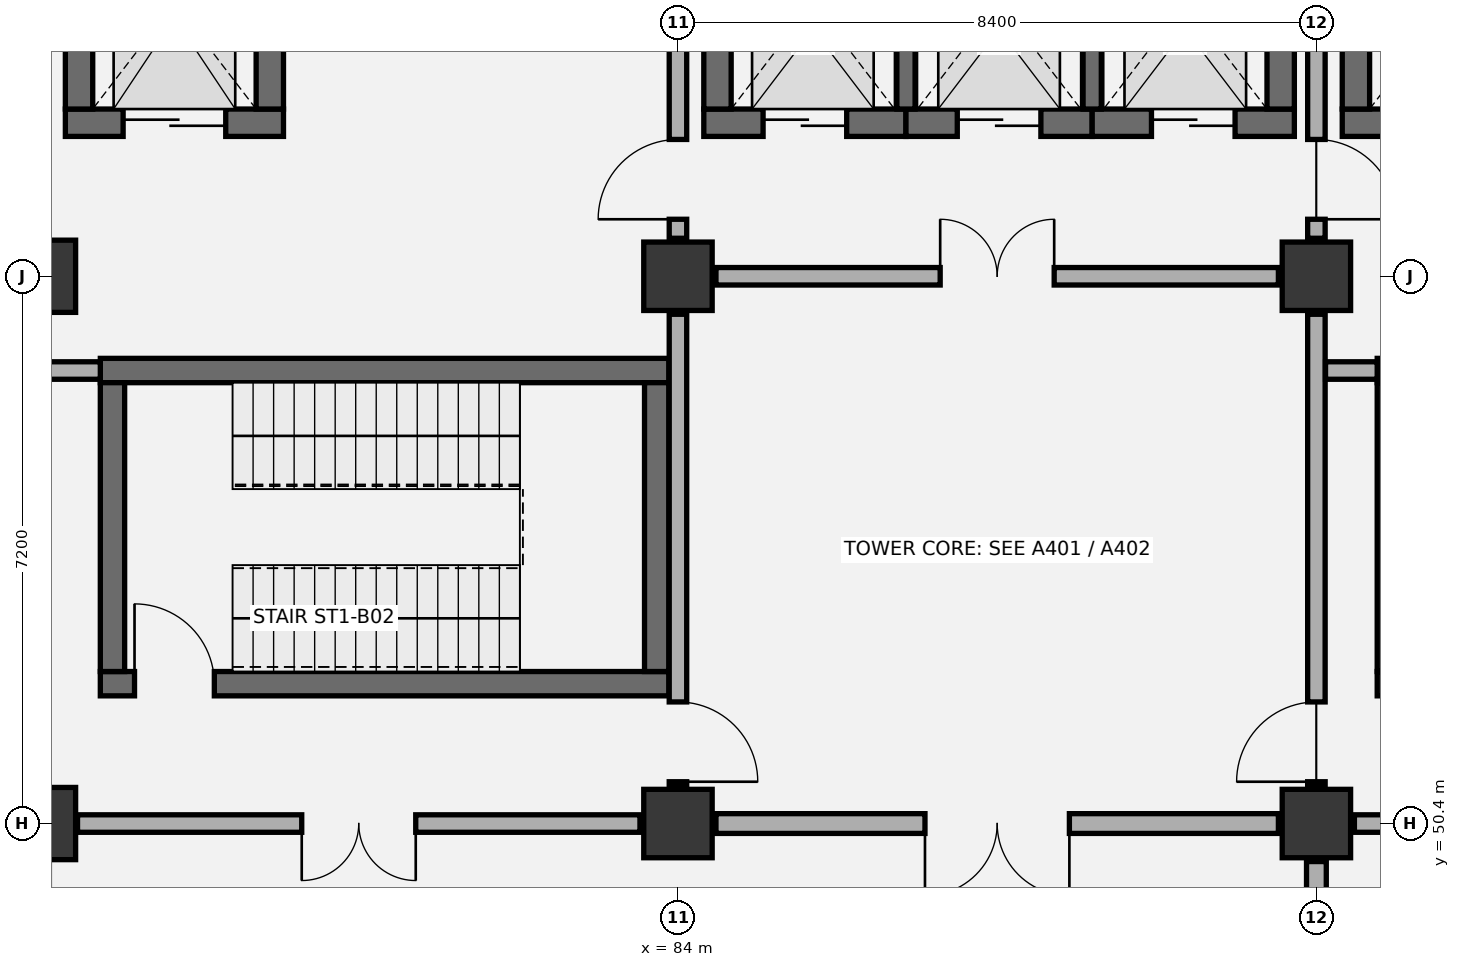
"""IFC4 building model, lengths in metres.
Left out: names, types, materials, properties, quantities, classifications, styles, units other than length and angle.
Written with IfcOpenShell. Run it as: python <this file> out.ifc"""

import sys

from ifc_helpers import new_model, si_unit, direction, frame, frame_2d, origin, origin_2d, place, context, subcontext, project, spatial, rectangle, extrude, element, fill, save


model = new_model("IFC4")
c1 = context("Model", 3, precision=1e-05, world=origin(), true_north=direction((0.0, 1.0)))
c2 = subcontext(c1, "Body", "Model", "MODEL_VIEW")
j1 = project(units=[si_unit("LENGTHUNIT", "METRE"), si_unit("PLANEANGLEUNIT", "RADIAN")], contexts=[c1])
p1 = place(None, origin())
s1 = spatial("IfcSite", under=j1, at=p1, CompositionType="ELEMENT")
p2 = place(p1, origin())
s2 = spatial("IfcBuilding", under=s1, at=p2, CompositionType="ELEMENT")
p3 = place(p2, frame((0.0, 0.0, -9.6)))
s3 = spatial("IfcBuildingStorey", under=s2, at=p3, CompositionType="ELEMENT", Elevation=-9.6)
for number, where, z_axis, x_axis in (
    (1, (75.6, 50.4, 0.0), (0.0, 0.0, 1.0), (1.0, 0.0, 0.0)),
    (2, (75.6, 57.6, 0.0), (0.0, 0.0, 1.0), (1.0, 0.0, 0.0)),
):
    element("IfcColumn", number, at=place(p3, frame(where, z_axis=z_axis, x_axis=x_axis)), inside=s3, PredefinedType="COLUMN", context=c2, shape_type="SweptSolid", body=[
        extrude(rectangle(XDim=0.95, YDim=0.95, at=origin_2d()), origin(), (0.0, 0.0, 1.0), 4.8),
    ])
for number, where, z_axis, x_axis in (
    (3, (84.0, 50.4, 0.0), (0.0, 0.0, 1.0), (1.0, 0.0, 0.0)),
    (4, (84.0, 57.6, 0.0), (0.0, 0.0, 1.0), (1.0, 0.0, 0.0)),
    (5, (92.4, 50.4, 0.0), (0.0, 0.0, 1.0), (1.0, 0.0, 0.0)),
    (6, (92.4, 57.6, 0.0), (0.0, 0.0, 1.0), (1.0, 0.0, 0.0)),
):
    element("IfcColumn", number, at=place(p3, frame(where, z_axis=z_axis, x_axis=x_axis)), inside=s3, PredefinedType="COLUMN", context=c2, shape_type="SweptSolid", body=[
        extrude(rectangle(XDim=0.9, YDim=0.9, at=origin_2d()), origin(), (0.0, 0.0, 1.0), 4.8),
    ])
p4 = place(p3, frame((76.4, 52.24, 0.0), z_axis=(0.0, 0.0, 1.0), x_axis=(1.0, 0.0, 0.0)))
e7 = element("IfcWall", 7, at=p4, inside=s3, PredefinedType="SHEAR", context=c2, shape_type="SweptSolid", body=[
    extrude(rectangle(XDim=7.48, YDim=0.32, at=frame_2d((3.74, 0.0))), origin(), (0.0, 0.0, 1.0), 4.4),
])
p5 = place(p4, frame((0.45, 0.0, 0.0)))
e8 = element("IfcOpeningElement", 8, at=p5, cuts=e7, PredefinedType="OPENING", context=c2, shape_type="SweptSolid", body=[
    extrude(rectangle(XDim=1.05, YDim=2.15, at=frame_2d((0.525, 1.075))), frame((0.0, 0.17, 0.0), z_axis=(0.0, -1.0, 0.0), x_axis=(1.0, 0.0, 0.0)), (0.0, 0.0, 1.0), 0.34),
])
p6 = place(p3, frame((76.4, 56.36, 0.0), z_axis=(0.0, 0.0, 1.0), x_axis=(1.0, 0.0, 0.0)))
e9 = element("IfcWall", 9, at=p6, inside=s3, PredefinedType="SHEAR", context=c2, shape_type="SweptSolid", body=[
    extrude(rectangle(XDim=7.48, YDim=0.32, at=frame_2d((3.74, 0.0))), origin(), (0.0, 0.0, 1.0), 4.4),
])
for number, where, z_axis, x_axis in (
    (10, (76.56, 52.4, 0.0), (0.0, 0.0, 1.0), (0.0, 1.0, 0.0)),
    (11, (83.72, 52.4, 0.0), (0.0, 0.0, 1.0), (0.0, 1.0, 0.0)),
):
    element("IfcWall", number, at=place(p3, frame(where, z_axis=z_axis, x_axis=x_axis)), inside=s3, PredefinedType="SHEAR", context=c2, shape_type="SweptSolid", body=[
        extrude(rectangle(XDim=3.8, YDim=0.32, at=frame_2d((1.9, 0.0))), origin(), (0.0, 0.0, 1.0), 4.4),
    ])
p7 = place(p3, frame((93.2, 52.24, 0.0), z_axis=(0.0, 0.0, 1.0), x_axis=(1.0, 0.0, 0.0)))
e12 = element("IfcWall", 12, at=p7, inside=s3, PredefinedType="SHEAR", context=c2, shape_type="SweptSolid", body=[
    extrude(rectangle(XDim=7.48, YDim=0.32, at=frame_2d((3.74, 0.0))), origin(), (0.0, 0.0, 1.0), 4.4),
])
p8 = place(p7, frame((0.45, 0.0, 0.0)))
e13 = element("IfcOpeningElement", 13, at=p8, cuts=e12, PredefinedType="OPENING", context=c2, shape_type="SweptSolid", body=[
    extrude(rectangle(XDim=1.05, YDim=2.15, at=frame_2d((0.525, 1.075))), frame((0.0, 0.17, 0.0), z_axis=(0.0, -1.0, 0.0), x_axis=(1.0, 0.0, 0.0)), (0.0, 0.0, 1.0), 0.34),
])
p9 = place(p3, frame((93.2, 56.36, 0.0), z_axis=(0.0, 0.0, 1.0), x_axis=(1.0, 0.0, 0.0)))
e14 = element("IfcWall", 14, at=p9, inside=s3, PredefinedType="SHEAR", context=c2, shape_type="SweptSolid", body=[
    extrude(rectangle(XDim=7.48, YDim=0.32, at=frame_2d((3.74, 0.0))), origin(), (0.0, 0.0, 1.0), 4.4),
])
p10 = place(p3, frame((93.36, 52.4, 0.0), z_axis=(0.0, 0.0, 1.0), x_axis=(0.0, 1.0, 0.0)))
e15 = element("IfcWall", 15, at=p10, inside=s3, PredefinedType="SHEAR", context=c2, shape_type="SweptSolid", body=[
    extrude(rectangle(XDim=3.8, YDim=0.32, at=frame_2d((1.9, 0.0))), origin(), (0.0, 0.0, 1.0), 4.4),
])
p11 = place(p3, frame((75.94, 59.62, -0.75), z_axis=(0.0, 0.0, 1.0), x_axis=(1.0, 0.0, 0.0)))
e16 = element("IfcWall", 16, at=p11, inside=s3, PredefinedType="SHEAR", context=c2, shape_type="SweptSolid", body=[
    extrude(rectangle(XDim=2.87, YDim=0.36, at=frame_2d((1.435, 0.0))), origin(), (0.0, 0.0, 1.0), 5.15),
])
p12 = place(p11, frame((0.76, 0.0, 0.75)))
e17 = element("IfcOpeningElement", 17, at=p12, cuts=e16, PredefinedType="OPENING", context=c2, shape_type="SweptSolid", body=[
    extrude(rectangle(XDim=1.35, YDim=2.2, at=frame_2d((0.675, 1.1))), frame((0.0, 0.19, 0.0), z_axis=(0.0, -1.0, 0.0), x_axis=(1.0, 0.0, 0.0)), (0.0, 0.0, 1.0), 0.38),
])
for number, where, z_axis, x_axis in (
    (18, (76.12, 59.8, -0.75), (0.0, 0.0, 1.0), (0.0, 1.0, 0.0)),
    (19, (78.63, 59.8, -0.75), (0.0, 0.0, 1.0), (0.0, 1.0, 0.0)),
):
    element("IfcWall", number, at=place(p3, frame(where, z_axis=z_axis, x_axis=x_axis)), inside=s3, PredefinedType="SHEAR", context=c2, shape_type="SweptSolid", body=[
        extrude(rectangle(XDim=2.8, YDim=0.36, at=frame_2d((1.4, 0.0))), origin(), (0.0, 0.0, 1.0), 5.15),
    ])
p13 = place(p3, frame((84.34, 59.62, -0.75), z_axis=(0.0, 0.0, 1.0), x_axis=(1.0, 0.0, 0.0)))
e20 = element("IfcWall", 20, at=p13, inside=s3, PredefinedType="SHEAR", context=c2, shape_type="SweptSolid", body=[
    extrude(rectangle(XDim=2.66, YDim=0.36, at=frame_2d((1.33, 0.0))), origin(), (0.0, 0.0, 1.0), 5.15),
])
p14 = place(p13, frame((0.78, 0.0, 0.75)))
e21 = element("IfcOpeningElement", 21, at=p14, cuts=e20, PredefinedType="OPENING", context=c2, shape_type="SweptSolid", body=[
    extrude(rectangle(XDim=1.1, YDim=2.15, at=frame_2d((0.55, 1.075))), frame((0.0, 0.19, 0.0), z_axis=(0.0, -1.0, 0.0), x_axis=(1.0, 0.0, 0.0)), (0.0, 0.0, 1.0), 0.38),
])
p15 = place(p3, frame((87.0, 59.62, -0.75), z_axis=(0.0, 0.0, 1.0), x_axis=(1.0, 0.0, 0.0)))
e22 = element("IfcWall", 22, at=p15, inside=s3, PredefinedType="SHEAR", context=c2, shape_type="SweptSolid", body=[
    extrude(rectangle(XDim=2.45, YDim=0.36, at=frame_2d((1.225, 0.0))), origin(), (0.0, 0.0, 1.0), 5.15),
])
p16 = place(p15, frame((0.675, 0.0, 0.75)))
e23 = element("IfcOpeningElement", 23, at=p16, cuts=e22, PredefinedType="OPENING", context=c2, shape_type="SweptSolid", body=[
    extrude(rectangle(XDim=1.1, YDim=2.15, at=frame_2d((0.55, 1.075))), frame((0.0, 0.19, 0.0), z_axis=(0.0, -1.0, 0.0), x_axis=(1.0, 0.0, 0.0)), (0.0, 0.0, 1.0), 0.38),
])
p17 = place(p3, frame((89.45, 59.62, -0.75), z_axis=(0.0, 0.0, 1.0), x_axis=(1.0, 0.0, 0.0)))
e24 = element("IfcWall", 24, at=p17, inside=s3, PredefinedType="SHEAR", context=c2, shape_type="SweptSolid", body=[
    extrude(rectangle(XDim=2.66, YDim=0.36, at=frame_2d((1.33, 0.0))), origin(), (0.0, 0.0, 1.0), 5.15),
])
p18 = place(p17, frame((0.78, 0.0, 0.75)))
e25 = element("IfcOpeningElement", 25, at=p18, cuts=e24, PredefinedType="OPENING", context=c2, shape_type="SweptSolid", body=[
    extrude(rectangle(XDim=1.1, YDim=2.15, at=frame_2d((0.55, 1.075))), frame((0.0, 0.19, 0.0), z_axis=(0.0, -1.0, 0.0), x_axis=(1.0, 0.0, 0.0)), (0.0, 0.0, 1.0), 0.38),
])
for number, where, z_axis, x_axis in (
    (26, (84.52, 59.8, -0.75), (0.0, 0.0, 1.0), (0.0, 1.0, 0.0)),
    (27, (91.93, 59.8, -0.75), (0.0, 0.0, 1.0), (0.0, 1.0, 0.0)),
):
    element("IfcWall", number, at=place(p3, frame(where, z_axis=z_axis, x_axis=x_axis)), inside=s3, PredefinedType="SHEAR", context=c2, shape_type="SweptSolid", body=[
        extrude(rectangle(XDim=2.8, YDim=0.36, at=frame_2d((1.4, 0.0))), origin(), (0.0, 0.0, 1.0), 5.15),
    ])
for number, where, z_axis, x_axis in (
    (28, (87.0, 59.8, -0.75), (0.0, 0.0, 1.0), (0.0, 1.0, 0.0)),
    (29, (89.45, 59.8, -0.75), (0.0, 0.0, 1.0), (0.0, 1.0, 0.0)),
):
    element("IfcWall", number, at=place(p3, frame(where, z_axis=z_axis, x_axis=x_axis)), inside=s3, PredefinedType="SHEAR", context=c2, shape_type="SweptSolid", body=[
        extrude(rectangle(XDim=2.8, YDim=0.24, at=frame_2d((1.4, 0.0))), origin(), (0.0, 0.0, 1.0), 5.15),
    ])
p19 = place(p3, frame((92.74, 59.62, -0.75), z_axis=(0.0, 0.0, 1.0), x_axis=(1.0, 0.0, 0.0)))
e30 = element("IfcWall", 30, at=p19, inside=s3, PredefinedType="SHEAR", context=c2, shape_type="SweptSolid", body=[
    extrude(rectangle(XDim=2.87, YDim=0.36, at=frame_2d((1.435, 0.0))), origin(), (0.0, 0.0, 1.0), 5.15),
])
p20 = place(p19, frame((0.76, 0.0, 0.75)))
e31 = element("IfcOpeningElement", 31, at=p20, cuts=e30, PredefinedType="OPENING", context=c2, shape_type="SweptSolid", body=[
    extrude(rectangle(XDim=1.35, YDim=2.2, at=frame_2d((0.675, 1.1))), frame((0.0, 0.19, 0.0), z_axis=(0.0, -1.0, 0.0), x_axis=(1.0, 0.0, 0.0)), (0.0, 0.0, 1.0), 0.38),
])
p21 = place(p3, frame((92.92, 59.8, -0.75), z_axis=(0.0, 0.0, 1.0), x_axis=(0.0, 1.0, 0.0)))
e32 = element("IfcWall", 32, at=p21, inside=s3, PredefinedType="SHEAR", context=c2, shape_type="SweptSolid", body=[
    extrude(rectangle(XDim=2.8, YDim=0.36, at=frame_2d((1.4, 0.0))), origin(), (0.0, 0.0, 1.0), 5.15),
])
p22 = place(p3, frame((76.1, 50.4, 0.0), z_axis=(0.0, 0.0, 1.0), x_axis=(1.0, 0.0, 0.0)))
e33 = element("IfcWall", 33, at=p22, inside=s3, PredefinedType="PARTITIONING", context=c2, shape_type="SweptSolid", body=[
    extrude(rectangle(XDim=7.4, YDim=0.23, at=frame_2d((3.7, 0.0))), origin(), (0.0, 0.0, 1.0), 3.495),
])
p23 = place(p22, frame((2.95, 0.0, 0.0)))
e34 = element("IfcOpeningElement", 34, at=p23, cuts=e33, PredefinedType="OPENING", context=c2, shape_type="SweptSolid", body=[
    extrude(rectangle(XDim=1.5, YDim=2.15, at=frame_2d((0.75, 1.075))), frame((0.0, 0.125, 0.0), z_axis=(0.0, -1.0, 0.0), x_axis=(1.0, 0.0, 0.0)), (0.0, 0.0, 1.0), 0.25),
])
p24 = place(p3, frame((84.0, 50.9, 0.0), z_axis=(0.0, 0.0, 1.0), x_axis=(0.0, 1.0, 0.0)))
e35 = element("IfcWall", 35, at=p24, inside=s3, PredefinedType="PARTITIONING", context=c2, shape_type="SweptSolid", body=[
    extrude(rectangle(XDim=6.2, YDim=0.23, at=frame_2d((3.1, 0.0))), origin(), (0.0, 0.0, 1.0), 3.595),
])
p25 = place(p24, frame((0.05, 0.0, 0.0)))
e36 = element("IfcOpeningElement", 36, at=p25, cuts=e35, PredefinedType="OPENING", context=c2, shape_type="SweptSolid", body=[
    extrude(rectangle(XDim=1.05, YDim=2.15, at=frame_2d((0.525, 1.075))), frame((0.0, 0.125, 0.0), z_axis=(0.0, -1.0, 0.0), x_axis=(1.0, 0.0, 0.0)), (0.0, 0.0, 1.0), 0.25),
])
p26 = place(p3, frame((75.72, 56.36, 0.0), z_axis=(0.0, 0.0, 1.0), x_axis=(1.0, 0.0, 0.0)))
e37 = element("IfcWall", 37, at=p26, inside=s3, PredefinedType="PARTITIONING", context=c2, shape_type="SweptSolid", body=[
    extrude(rectangle(XDim=0.68, YDim=0.23, at=frame_2d((0.34, 0.0))), origin(), (0.0, 0.0, 1.0), 4.4),
])
p27 = place(p3, frame((84.0, 58.1, 0.0), z_axis=(0.0, 0.0, 1.0), x_axis=(0.0, 1.0, 0.0)))
e38 = element("IfcWall", 38, at=p27, inside=s3, PredefinedType="PARTITIONING", context=c2, shape_type="SweptSolid", body=[
    extrude(rectangle(XDim=6.2, YDim=0.23, at=frame_2d((3.1, 0.0))), origin(), (0.0, 0.0, 1.0), 3.595),
])
p28 = place(p27, frame((0.25, 0.0, 0.0)))
e39 = element("IfcOpeningElement", 39, at=p28, cuts=e38, PredefinedType="OPENING", context=c2, shape_type="SweptSolid", body=[
    extrude(rectangle(XDim=1.05, YDim=2.15, at=frame_2d((0.525, 1.075))), frame((0.0, 0.125, 0.0), z_axis=(0.0, -1.0, 0.0), x_axis=(1.0, 0.0, 0.0)), (0.0, 0.0, 1.0), 0.25),
])
p29 = place(p3, frame((92.4, 43.7, 0.0), z_axis=(0.0, 0.0, 1.0), x_axis=(0.0, 1.0, 0.0)))
e40 = element("IfcWall", 40, at=p29, inside=s3, PredefinedType="PARTITIONING", context=c2, shape_type="SweptSolid", body=[
    extrude(rectangle(XDim=6.2, YDim=0.26, at=frame_2d((3.1, 0.0))), origin(), (0.0, 0.0, 1.0), 3.595),
])
p30 = place(p29, frame((2.1, 0.0, 0.0)))
e41 = element("IfcOpeningElement", 41, at=p30, cuts=e40, PredefinedType="OPENING", context=c2, shape_type="SweptSolid", body=[
    extrude(rectangle(XDim=2.0, YDim=2.35, at=frame_2d((1.0, 1.175))), frame((0.0, 0.14, 0.0), z_axis=(0.0, -1.0, 0.0), x_axis=(1.0, 0.0, 0.0)), (0.0, 0.0, 1.0), 0.28),
])
p31 = place(p3, frame((84.5, 50.4, 0.0), z_axis=(0.0, 0.0, 1.0), x_axis=(1.0, 0.0, 0.0)))
e42 = element("IfcWall", 42, at=p31, inside=s3, PredefinedType="PARTITIONING", context=c2, shape_type="SweptSolid", body=[
    extrude(rectangle(XDim=7.4, YDim=0.26, at=frame_2d((3.7, 0.0))), origin(), (0.0, 0.0, 1.0), 3.495),
])
p32 = place(p31, frame((2.75, 0.0, 0.0)))
e43 = element("IfcOpeningElement", 43, at=p32, cuts=e42, PredefinedType="OPENING", context=c2, shape_type="SweptSolid", body=[
    extrude(rectangle(XDim=1.9, YDim=2.3, at=frame_2d((0.95, 1.15))), frame((0.0, 0.14, 0.0), z_axis=(0.0, -1.0, 0.0), x_axis=(1.0, 0.0, 0.0)), (0.0, 0.0, 1.0), 0.28),
])
p33 = place(p3, frame((92.4, 50.9, 0.0), z_axis=(0.0, 0.0, 1.0), x_axis=(0.0, 1.0, 0.0)))
e44 = element("IfcWall", 44, at=p33, inside=s3, PredefinedType="PARTITIONING", context=c2, shape_type="SweptSolid", body=[
    extrude(rectangle(XDim=6.2, YDim=0.23, at=frame_2d((3.1, 0.0))), origin(), (0.0, 0.0, 1.0), 3.595),
])
p34 = place(p33, frame((0.05, 0.0, 0.0)))
e45 = element("IfcOpeningElement", 45, at=p34, cuts=e44, PredefinedType="OPENING", context=c2, shape_type="SweptSolid", body=[
    extrude(rectangle(XDim=1.05, YDim=2.15, at=frame_2d((0.525, 1.075))), frame((0.0, 0.125, 0.0), z_axis=(0.0, -1.0, 0.0), x_axis=(1.0, 0.0, 0.0)), (0.0, 0.0, 1.0), 0.25),
])
p35 = place(p3, frame((84.5, 57.6, 0.0), z_axis=(0.0, 0.0, 1.0), x_axis=(1.0, 0.0, 0.0)))
e46 = element("IfcWall", 46, at=p35, inside=s3, PredefinedType="PARTITIONING", context=c2, shape_type="SweptSolid", body=[
    extrude(rectangle(XDim=7.4, YDim=0.23, at=frame_2d((3.7, 0.0))), origin(), (0.0, 0.0, 1.0), 3.495),
])
p36 = place(p35, frame((2.95, 0.0, 0.0)))
e47 = element("IfcOpeningElement", 47, at=p36, cuts=e46, PredefinedType="OPENING", context=c2, shape_type="SweptSolid", body=[
    extrude(rectangle(XDim=1.5, YDim=2.15, at=frame_2d((0.75, 1.075))), frame((0.0, 0.125, 0.0), z_axis=(0.0, -1.0, 0.0), x_axis=(1.0, 0.0, 0.0)), (0.0, 0.0, 1.0), 0.25),
])
p37 = place(p3, frame((92.4, 58.1, 0.0), z_axis=(0.0, 0.0, 1.0), x_axis=(0.0, 1.0, 0.0)))
e48 = element("IfcWall", 48, at=p37, inside=s3, PredefinedType="PARTITIONING", context=c2, shape_type="SweptSolid", body=[
    extrude(rectangle(XDim=6.2, YDim=0.23, at=frame_2d((3.1, 0.0))), origin(), (0.0, 0.0, 1.0), 3.595),
])
p38 = place(p37, frame((0.25, 0.0, 0.0)))
e49 = element("IfcOpeningElement", 49, at=p38, cuts=e48, PredefinedType="OPENING", context=c2, shape_type="SweptSolid", body=[
    extrude(rectangle(XDim=1.05, YDim=2.15, at=frame_2d((0.525, 1.075))), frame((0.0, 0.125, 0.0), z_axis=(0.0, -1.0, 0.0), x_axis=(1.0, 0.0, 0.0)), (0.0, 0.0, 1.0), 0.25),
])
p39 = place(p3, frame((92.9, 50.4, 0.0), z_axis=(0.0, 0.0, 1.0), x_axis=(1.0, 0.0, 0.0)))
e50 = element("IfcWall", 50, at=p39, inside=s3, PredefinedType="PARTITIONING", context=c2, shape_type="SweptSolid", body=[
    extrude(rectangle(XDim=7.4, YDim=0.23, at=frame_2d((3.7, 0.0))), origin(), (0.0, 0.0, 1.0), 3.495),
])
p40 = place(p39, frame((2.95, 0.0, 0.0)))
e51 = element("IfcOpeningElement", 51, at=p40, cuts=e50, PredefinedType="OPENING", context=c2, shape_type="SweptSolid", body=[
    extrude(rectangle(XDim=1.5, YDim=2.15, at=frame_2d((0.75, 1.075))), frame((0.0, 0.125, 0.0), z_axis=(0.0, -1.0, 0.0), x_axis=(1.0, 0.0, 0.0)), (0.0, 0.0, 1.0), 0.25),
])
p41 = place(p3, frame((92.52, 56.36, 0.0), z_axis=(0.0, 0.0, 1.0), x_axis=(1.0, 0.0, 0.0)))
e52 = element("IfcWall", 52, at=p41, inside=s3, PredefinedType="PARTITIONING", context=c2, shape_type="SweptSolid", body=[
    extrude(rectangle(XDim=0.68, YDim=0.23, at=frame_2d((0.34, 0.0))), origin(), (0.0, 0.0, 1.0), 4.4),
])
p42 = place(p5, origin())
e53 = element("IfcDoor", 53, at=p42, inside=s3, OperationType="SINGLE_SWING_LEFT", PredefinedType="DOOR", context=c2, shape_type="SweptSolid", body=[
    extrude(rectangle(XDim=1.05, YDim=2.15, at=frame_2d((0.525, 1.075))), frame((0.0, 0.025, 0.0), z_axis=(0.0, -1.0, 0.0), x_axis=(1.0, 0.0, 0.0)), (0.0, 0.0, 1.0), 0.05),
])
fill(e8, e53)
p43 = place(p12, origin())
e54 = element("IfcDoor", 54, at=p43, inside=s3, OperationType="DOUBLE_DOOR_SLIDING", PredefinedType="DOOR", context=c2, shape_type="SweptSolid", body=[
    extrude(rectangle(XDim=1.35, YDim=2.2, at=frame_2d((0.675, 1.1))), frame((0.0, 0.025, 0.0), z_axis=(0.0, -1.0, 0.0), x_axis=(1.0, 0.0, 0.0)), (0.0, 0.0, 1.0), 0.05),
])
fill(e17, e54)
p44 = place(p14, origin())
e55 = element("IfcDoor", 55, at=p44, inside=s3, OperationType="DOUBLE_DOOR_SLIDING", PredefinedType="DOOR", context=c2, shape_type="SweptSolid", body=[
    extrude(rectangle(XDim=1.1, YDim=2.15, at=frame_2d((0.55, 1.075))), frame((0.0, 0.025, 0.0), z_axis=(0.0, -1.0, 0.0), x_axis=(1.0, 0.0, 0.0)), (0.0, 0.0, 1.0), 0.05),
])
fill(e21, e55)
p45 = place(p16, origin())
e56 = element("IfcDoor", 56, at=p45, inside=s3, OperationType="DOUBLE_DOOR_SLIDING", PredefinedType="DOOR", context=c2, shape_type="SweptSolid", body=[
    extrude(rectangle(XDim=1.1, YDim=2.15, at=frame_2d((0.55, 1.075))), frame((0.0, 0.025, 0.0), z_axis=(0.0, -1.0, 0.0), x_axis=(1.0, 0.0, 0.0)), (0.0, 0.0, 1.0), 0.05),
])
fill(e23, e56)
p46 = place(p18, origin())
e57 = element("IfcDoor", 57, at=p46, inside=s3, OperationType="DOUBLE_DOOR_SLIDING", PredefinedType="DOOR", context=c2, shape_type="SweptSolid", body=[
    extrude(rectangle(XDim=1.1, YDim=2.15, at=frame_2d((0.55, 1.075))), frame((0.0, 0.025, 0.0), z_axis=(0.0, -1.0, 0.0), x_axis=(1.0, 0.0, 0.0)), (0.0, 0.0, 1.0), 0.05),
])
fill(e25, e57)
p47 = place(p23, frame((1.5, 0.0, 0.0), z_axis=(0.0, 0.0, 1.0), x_axis=(-1.0, 0.0, 0.0)))
e58 = element("IfcDoor", 58, at=p47, inside=s3, OperationType="DOUBLE_DOOR_SINGLE_SWING", PredefinedType="DOOR", context=c2, shape_type="SweptSolid", body=[
    extrude(rectangle(XDim=1.5, YDim=2.15, at=frame_2d((0.75, 1.075))), frame((0.0, 0.025, 0.0), z_axis=(0.0, -1.0, 0.0), x_axis=(1.0, 0.0, 0.0)), (0.0, 0.0, 1.0), 0.05),
])
fill(e34, e58)
p48 = place(p25, frame((1.05, 0.0, 0.0), z_axis=(0.0, 0.0, 1.0), x_axis=(-1.0, 0.0, 0.0)))
e59 = element("IfcDoor", 59, at=p48, inside=s3, OperationType="SINGLE_SWING_RIGHT", PredefinedType="DOOR", context=c2, shape_type="SweptSolid", body=[
    extrude(rectangle(XDim=1.05, YDim=2.15, at=frame_2d((0.525, 1.075))), frame((0.0, 0.025, 0.0), z_axis=(0.0, -1.0, 0.0), x_axis=(1.0, 0.0, 0.0)), (0.0, 0.0, 1.0), 0.05),
])
fill(e36, e59)
p49 = place(p28, origin())
e60 = element("IfcDoor", 60, at=p49, inside=s3, OperationType="SINGLE_SWING_LEFT", PredefinedType="DOOR", context=c2, shape_type="SweptSolid", body=[
    extrude(rectangle(XDim=1.05, YDim=2.15, at=frame_2d((0.525, 1.075))), frame((0.0, 0.025, 0.0), z_axis=(0.0, -1.0, 0.0), x_axis=(1.0, 0.0, 0.0)), (0.0, 0.0, 1.0), 0.05),
])
fill(e39, e60)
p50 = place(p32, frame((1.9, 0.0, 0.0), z_axis=(0.0, 0.0, 1.0), x_axis=(-1.0, 0.0, 0.0)))
e61 = element("IfcDoor", 61, at=p50, inside=s3, OperationType="DOUBLE_DOOR_SINGLE_SWING", PredefinedType="DOOR", context=c2, shape_type="SweptSolid", body=[
    extrude(rectangle(XDim=1.9, YDim=2.3, at=frame_2d((0.95, 1.15))), frame((0.0, 0.025, 0.0), z_axis=(0.0, -1.0, 0.0), x_axis=(1.0, 0.0, 0.0)), (0.0, 0.0, 1.0), 0.05),
])
fill(e43, e61)
p51 = place(p34, origin())
e62 = element("IfcDoor", 62, at=p51, inside=s3, OperationType="SINGLE_SWING_LEFT", PredefinedType="DOOR", context=c2, shape_type="SweptSolid", body=[
    extrude(rectangle(XDim=1.05, YDim=2.15, at=frame_2d((0.525, 1.075))), frame((0.0, 0.025, 0.0), z_axis=(0.0, -1.0, 0.0), x_axis=(1.0, 0.0, 0.0)), (0.0, 0.0, 1.0), 0.05),
])
fill(e45, e62)
p52 = place(p36, origin())
e63 = element("IfcDoor", 63, at=p52, inside=s3, OperationType="DOUBLE_DOOR_SINGLE_SWING", PredefinedType="DOOR", context=c2, shape_type="SweptSolid", body=[
    extrude(rectangle(XDim=1.5, YDim=2.15, at=frame_2d((0.75, 1.075))), frame((0.0, 0.025, 0.0), z_axis=(0.0, -1.0, 0.0), x_axis=(1.0, 0.0, 0.0)), (0.0, 0.0, 1.0), 0.05),
])
fill(e47, e63)
p53 = place(p38, frame((1.05, 0.0, 0.0), z_axis=(0.0, 0.0, 1.0), x_axis=(-1.0, 0.0, 0.0)))
e64 = element("IfcDoor", 64, at=p53, inside=s3, OperationType="SINGLE_SWING_RIGHT", PredefinedType="DOOR", context=c2, shape_type="SweptSolid", body=[
    extrude(rectangle(XDim=1.05, YDim=2.15, at=frame_2d((0.525, 1.075))), frame((0.0, 0.025, 0.0), z_axis=(0.0, -1.0, 0.0), x_axis=(1.0, 0.0, 0.0)), (0.0, 0.0, 1.0), 0.05),
])
fill(e49, e64)
save(model, sys.argv[1])
